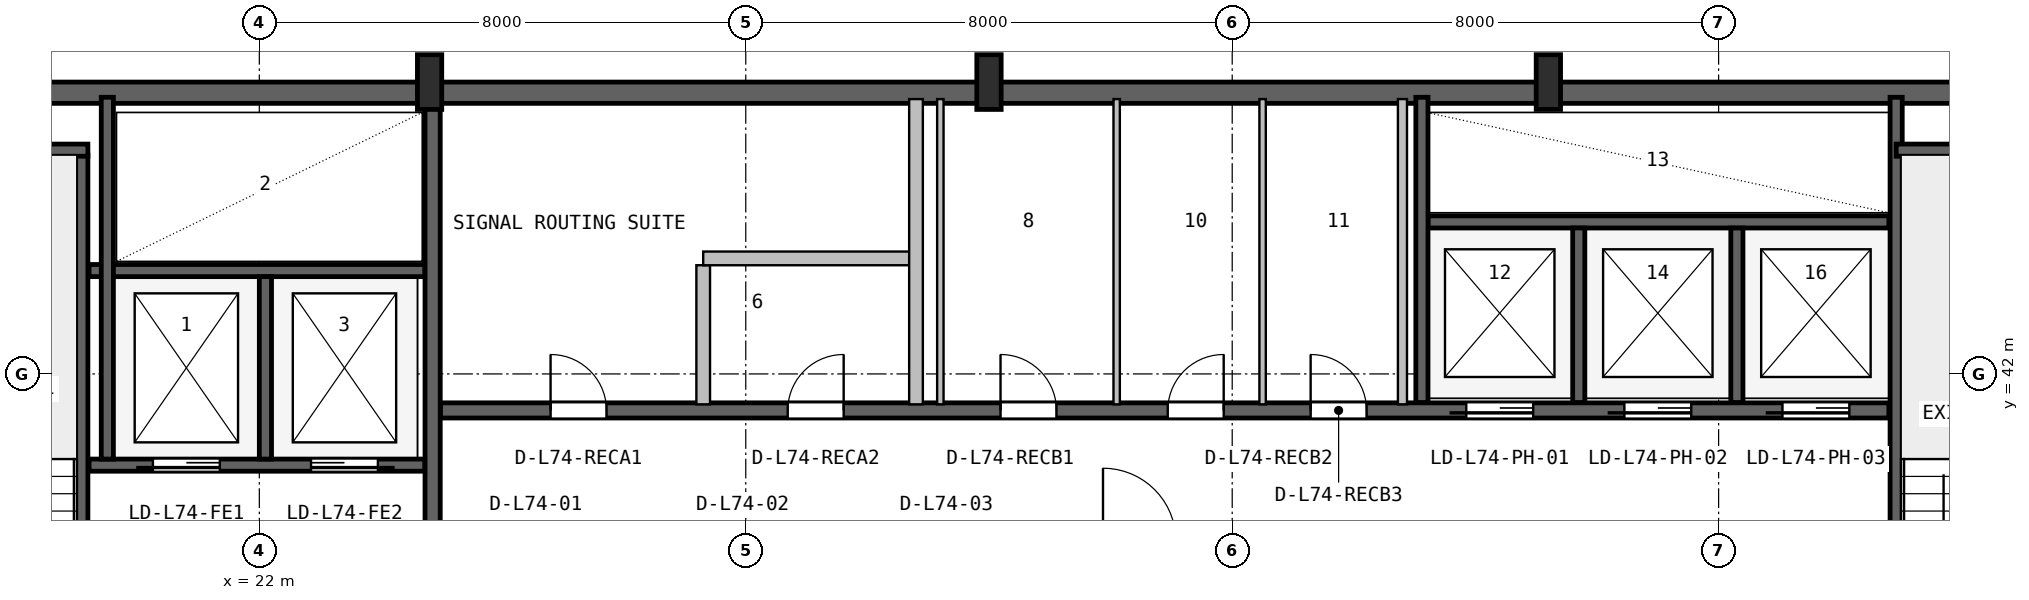
"""IFC4 building model, lengths in metres.
Left out: names, types, materials, properties, quantities, classifications, styles, units other than length and angle.
Written with IfcOpenShell. Run it as: python <this file> out.ifc"""

import sys

from ifc_helpers import new_model, si_unit, direction, frame, frame_2d, origin, origin_2d, place, context, subcontext, project, spatial, rectangle, i_section, extrude, source, transform, mapped, element, fill, save


model = new_model("IFC4")
c1 = context("Model", 3, precision=1e-05, world=origin(), true_north=direction((0.0, 1.0)))
c2 = subcontext(c1, "Body", "Model", "MODEL_VIEW")
j1 = project(units=[si_unit("LENGTHUNIT", "METRE"), si_unit("PLANEANGLEUNIT", "RADIAN")], contexts=[c1])
p1 = place(None, origin())
s1 = spatial("IfcSite", under=j1, at=p1, CompositionType="ELEMENT")
p2 = place(p1, origin())
s2 = spatial("IfcBuilding", under=s1, at=p2, CompositionType="ELEMENT")
p3 = place(p2, frame((0.0, 0.0, 296.4)))
s3 = spatial("IfcBuildingStorey", under=s2, at=p3, CompositionType="ELEMENT", Elevation=296.4)
p4 = place(p3, frame((15.325, 46.625, 0.0), z_axis=(0.0, 0.0, 1.0), x_axis=(1.0, 0.0, 0.0)))
e1 = element("IfcWall", 1, at=p4, inside=s3, PredefinedType="SHEAR", context=c2, shape_type="SweptSolid", body=[
    extrude(rectangle(XDim=37.35, YDim=0.35, at=frame_2d((18.675, 0.0))), origin(), (0.0, 0.0, 1.0), 3.52),
])
m1 = source(origin(), c2, "Body", "SweptSolid", [
    extrude(i_section(OverallWidth=0.4, OverallDepth=0.9, WebThickness=0.016, FlangeThickness=0.028, FilletRadius=0.016, at=origin_2d()), origin(), (0.0, 0.0, 1.0), 3.8),
])
for number, where, z_axis, x_axis in (
    (2, (24.8, 46.8, 0.0), (0.0, 0.0, 1.0), (1.0, 0.0, 0.0)),
    (3, (34.0, 46.8, 0.0), (0.0, 0.0, 1.0), (1.0, 0.0, 0.0)),
    (4, (43.2, 46.8, 0.0), (0.0, 0.0, 1.0), (1.0, 0.0, 0.0)),
):
    element("IfcColumn", number, at=place(p3, frame(where, z_axis=z_axis, x_axis=x_axis)), inside=s3, PredefinedType="COLUMN", context=c2, shape_type="MappedRepresentation", body=[
        mapped(m1, transform((0.0, 0.0, 0.0), x_axis=(1.0, 0.0, 0.0), y_axis=(0.0, 1.0, 0.0), z_axis=(0.0, 0.0, 1.0), scale=1.0)),
    ])
p5 = place(p3, frame((19.08, 35.95, 0.0), z_axis=(0.0, 0.0, 1.0), x_axis=(0.0, 1.0, 0.0)))
e5 = element("IfcWall", 5, at=p5, inside=s3, PredefinedType="SHEAR", context=c2, shape_type="SweptSolid", body=[
    extrude(rectangle(XDim=9.65, YDim=0.2, at=frame_2d((4.825, 0.0))), origin(), (0.0, 0.0, 1.0), 3.52),
])
p6 = place(p5, frame((0.25, 0.0, 0.0)))
e6 = element("IfcOpeningElement", 6, at=p6, cuts=e5, PredefinedType="OPENING", context=c2, shape_type="SweptSolid", body=[
    extrude(rectangle(XDim=0.95, YDim=2.1, at=frame_2d((0.475, 1.05))), frame((0.0, 0.11, 0.0), z_axis=(0.0, -1.0, 0.0), x_axis=(1.0, 0.0, 0.0)), (0.0, 0.0, 1.0), 0.22),
])
p7 = place(p3, frame((15.95, 45.68, 0.0), z_axis=(0.0, 0.0, 1.0), x_axis=(1.0, 0.0, 0.0)))
e7 = element("IfcWall", 7, at=p7, inside=s3, PredefinedType="SHEAR", context=c2, shape_type="SweptSolid", body=[
    extrude(rectangle(XDim=3.23, YDim=0.2, at=frame_2d((1.615, 0.0))), origin(), (0.0, 0.0, 1.0), 3.52),
])
p8 = place(p3, frame((24.85, 36.05, 0.0), z_axis=(0.0, 0.0, 1.0), x_axis=(0.0, 1.0, 0.0)))
e8 = element("IfcWall", 8, at=p8, inside=s3, PredefinedType="SHEAR", context=c2, shape_type="SweptSolid", body=[
    extrude(rectangle(XDim=10.45, YDim=0.25, at=frame_2d((5.225, 0.0))), origin(), (0.0, 0.0, 1.0), 3.52),
])
p9 = place(p3, frame((19.2, 40.5, 0.0), z_axis=(0.0, 0.0, 1.0), x_axis=(1.0, 0.0, 0.0)))
e9 = element("IfcWall", 9, at=p9, inside=s3, PredefinedType="SHEAR", context=c2, shape_type="SweptSolid", body=[
    extrude(rectangle(XDim=5.52, YDim=0.2, at=frame_2d((2.76, 0.0))), origin(), (0.0, 0.0, 1.0), 3.52),
])
p10 = place(p9, frame((1.05, 0.0, 0.0)))
e10 = element("IfcOpeningElement", 10, at=p10, cuts=e9, PredefinedType="OPENING", context=c2, shape_type="SweptSolid", body=[
    extrude(rectangle(XDim=1.1, YDim=2.18, at=frame_2d((0.55, 1.09))), frame((0.0, 0.11, 0.0), z_axis=(0.0, -1.0, 0.0), x_axis=(1.0, 0.0, 0.0)), (0.0, 0.0, 1.0), 0.22),
])
p11 = place(p9, frame((3.65, 0.0, 0.0)))
e11 = element("IfcOpeningElement", 11, at=p11, cuts=e9, PredefinedType="OPENING", context=c2, shape_type="SweptSolid", body=[
    extrude(rectangle(XDim=1.1, YDim=2.18, at=frame_2d((0.55, 1.09))), frame((0.0, 0.11, 0.0), z_axis=(0.0, -1.0, 0.0), x_axis=(1.0, 0.0, 0.0)), (0.0, 0.0, 1.0), 0.22),
])
p12 = place(p3, frame((19.2, 43.7, 0.0), z_axis=(0.0, 0.0, 1.0), x_axis=(1.0, 0.0, 0.0)))
e12 = element("IfcWall", 12, at=p12, inside=s3, PredefinedType="SHEAR", context=c2, shape_type="SweptSolid", body=[
    extrude(rectangle(XDim=5.52, YDim=0.2, at=frame_2d((2.76, 0.0))), origin(), (0.0, 0.0, 1.0), 3.52),
])
p13 = place(p3, frame((22.1, 40.6, 0.0), z_axis=(0.0, 0.0, 1.0), x_axis=(0.0, 1.0, 0.0)))
e13 = element("IfcWall", 13, at=p13, inside=s3, PredefinedType="SHEAR", context=c2, shape_type="SweptSolid", body=[
    extrude(rectangle(XDim=3.0, YDim=0.2, at=frame_2d((1.5, 0.0))), origin(), (0.0, 0.0, 1.0), 3.52),
])
p14 = place(p3, frame((19.5, 40.6, 0.0), z_axis=(0.0, 0.0, 1.0), x_axis=(0.0, 1.0, 0.0)))
e14 = element("IfcWall", 14, at=p14, inside=s3, PredefinedType="SHEAR", context=c2, shape_type="SweptSolid", body=[
    extrude(rectangle(XDim=5.95, YDim=0.2, at=frame_2d((2.975, 0.0))), origin(), (0.0, 0.0, 1.0), 3.52),
])
p15 = place(p3, frame((48.92, 36.05, 0.0), z_axis=(0.0, 0.0, 1.0), x_axis=(0.0, 1.0, 0.0)))
e15 = element("IfcWall", 15, at=p15, inside=s3, PredefinedType="SHEAR", context=c2, shape_type="SweptSolid", body=[
    extrude(rectangle(XDim=10.5, YDim=0.2, at=frame_2d((5.25, 0.0))), origin(), (0.0, 0.0, 1.0), 3.52),
])
p16 = place(p3, frame((48.92, 45.68, 0.0), z_axis=(0.0, 0.0, 1.0), x_axis=(1.0, 0.0, 0.0)))
e16 = element("IfcWall", 16, at=p16, inside=s3, PredefinedType="SHEAR", context=c2, shape_type="SweptSolid", body=[
    extrude(rectangle(XDim=3.18, YDim=0.2, at=frame_2d((1.59, 0.0))), origin(), (0.0, 0.0, 1.0), 3.52),
])
p17 = place(p3, frame((24.98, 41.4, 0.0), z_axis=(0.0, 0.0, 1.0), x_axis=(1.0, 0.0, 0.0)))
e17 = element("IfcWall", 17, at=p17, inside=s3, PredefinedType="SHEAR", context=c2, shape_type="SweptSolid", body=[
    extrude(rectangle(XDim=23.82, YDim=0.25, at=frame_2d((11.91, 0.0))), origin(), (0.0, 0.0, 1.0), 3.52),
])
p18 = place(p17, frame((16.87, 0.0, 0.0)))
e18 = element("IfcOpeningElement", 18, at=p18, cuts=e17, PredefinedType="OPENING", context=c2, shape_type="SweptSolid", body=[
    extrude(rectangle(XDim=1.1, YDim=2.18, at=frame_2d((0.55, 1.09))), frame((0.0, 0.135, 0.0), z_axis=(0.0, -1.0, 0.0), x_axis=(1.0, 0.0, 0.0)), (0.0, 0.0, 1.0), 0.27),
])
p19 = place(p17, frame((19.47, 0.0, 0.0)))
e19 = element("IfcOpeningElement", 19, at=p19, cuts=e17, PredefinedType="OPENING", context=c2, shape_type="SweptSolid", body=[
    extrude(rectangle(XDim=1.1, YDim=2.18, at=frame_2d((0.55, 1.09))), frame((0.0, 0.135, 0.0), z_axis=(0.0, -1.0, 0.0), x_axis=(1.0, 0.0, 0.0)), (0.0, 0.0, 1.0), 0.27),
])
p20 = place(p17, frame((22.07, 0.0, 0.0)))
e20 = element("IfcOpeningElement", 20, at=p20, cuts=e17, PredefinedType="OPENING", context=c2, shape_type="SweptSolid", body=[
    extrude(rectangle(XDim=1.1, YDim=2.18, at=frame_2d((0.55, 1.09))), frame((0.0, 0.135, 0.0), z_axis=(0.0, -1.0, 0.0), x_axis=(1.0, 0.0, 0.0)), (0.0, 0.0, 1.0), 0.27),
])
p21 = place(p17, frame((1.81, 0.0, 0.0)))
e21 = element("IfcOpeningElement", 21, at=p21, cuts=e17, PredefinedType="OPENING", context=c2, shape_type="SweptSolid", body=[
    extrude(rectangle(XDim=0.92, YDim=2.08, at=frame_2d((0.46, 1.04))), frame((0.0, 0.135, 0.0), z_axis=(0.0, -1.0, 0.0), x_axis=(1.0, 0.0, 0.0)), (0.0, 0.0, 1.0), 0.27),
])
p22 = place(p17, frame((5.71, 0.0, 0.0)))
e22 = element("IfcOpeningElement", 22, at=p22, cuts=e17, PredefinedType="OPENING", context=c2, shape_type="SweptSolid", body=[
    extrude(rectangle(XDim=0.92, YDim=2.08, at=frame_2d((0.46, 1.04))), frame((0.0, 0.135, 0.0), z_axis=(0.0, -1.0, 0.0), x_axis=(1.0, 0.0, 0.0)), (0.0, 0.0, 1.0), 0.27),
])
p23 = place(p17, frame((9.21, 0.0, 0.0)))
e23 = element("IfcOpeningElement", 23, at=p23, cuts=e17, PredefinedType="OPENING", context=c2, shape_type="SweptSolid", body=[
    extrude(rectangle(XDim=0.92, YDim=2.08, at=frame_2d((0.46, 1.04))), frame((0.0, 0.135, 0.0), z_axis=(0.0, -1.0, 0.0), x_axis=(1.0, 0.0, 0.0)), (0.0, 0.0, 1.0), 0.27),
])
p24 = place(p17, frame((11.96, 0.0, 0.0)))
e24 = element("IfcOpeningElement", 24, at=p24, cuts=e17, PredefinedType="OPENING", context=c2, shape_type="SweptSolid", body=[
    extrude(rectangle(XDim=0.92, YDim=2.08, at=frame_2d((0.46, 1.04))), frame((0.0, 0.135, 0.0), z_axis=(0.0, -1.0, 0.0), x_axis=(1.0, 0.0, 0.0)), (0.0, 0.0, 1.0), 0.27),
])
p25 = place(p17, frame((14.31, 0.0, 0.0)))
e25 = element("IfcOpeningElement", 25, at=p25, cuts=e17, PredefinedType="OPENING", context=c2, shape_type="SweptSolid", body=[
    extrude(rectangle(XDim=0.92, YDim=2.08, at=frame_2d((0.46, 1.04))), frame((0.0, 0.135, 0.0), z_axis=(0.0, -1.0, 0.0), x_axis=(1.0, 0.0, 0.0)), (0.0, 0.0, 1.0), 0.27),
])
p26 = place(p3, frame((41.22, 44.5, 0.0), z_axis=(0.0, 0.0, 1.0), x_axis=(1.0, 0.0, 0.0)))
e26 = element("IfcWall", 26, at=p26, inside=s3, PredefinedType="SHEAR", context=c2, shape_type="SweptSolid", body=[
    extrude(rectangle(XDim=7.58, YDim=0.2, at=frame_2d((3.79, 0.0))), origin(), (0.0, 0.0, 1.0), 3.52),
])
p27 = place(p3, frame((41.12, 41.53, 0.0), z_axis=(0.0, 0.0, 1.0), x_axis=(0.0, 1.0, 0.0)))
e27 = element("IfcWall", 27, at=p27, inside=s3, PredefinedType="SHEAR", context=c2, shape_type="SweptSolid", body=[
    extrude(rectangle(XDim=5.02, YDim=0.2, at=frame_2d((2.51, 0.0))), origin(), (0.0, 0.0, 1.0), 3.52),
])
for number, where, z_axis, x_axis in (
    (28, (43.7, 41.53, 0.0), (0.0, 0.0, 1.0), (0.0, 1.0, 0.0)),
    (29, (46.3, 41.53, 0.0), (0.0, 0.0, 1.0), (0.0, 1.0, 0.0)),
):
    element("IfcWall", number, at=place(p3, frame(where, z_axis=z_axis, x_axis=x_axis)), inside=s3, PredefinedType="SHEAR", context=c2, shape_type="SweptSolid", body=[
        extrude(rectangle(XDim=2.87, YDim=0.2, at=frame_2d((1.435, 0.0))), origin(), (0.0, 0.0, 1.0), 3.52),
    ])
p28 = place(p3, frame((29.3, 41.5, 0.0), z_axis=(0.0, 0.0, 1.0), x_axis=(0.0, 1.0, 0.0)))
e30 = element("IfcWall", 30, at=p28, inside=s3, PredefinedType="PARTITIONING", context=c2, shape_type="SweptSolid", body=[
    extrude(rectangle(XDim=2.288, YDim=0.225, at=frame_2d((1.144, 0.0))), origin(), (0.0, 0.0, 1.0), 3.5),
])
p29 = place(p3, frame((29.3, 43.9, 0.0), z_axis=(0.0, 0.0, 1.0), x_axis=(1.0, 0.0, 0.0)))
e31 = element("IfcWall", 31, at=p29, inside=s3, PredefinedType="PARTITIONING", context=c2, shape_type="SweptSolid", body=[
    extrude(rectangle(XDim=3.5, YDim=0.225, at=frame_2d((1.75, 0.0))), origin(), (0.0, 0.0, 1.0), 3.5),
])
p30 = place(p3, frame((32.8, 41.5, 0.0), z_axis=(0.0, 0.0, 1.0), x_axis=(0.0, 1.0, 0.0)))
e32 = element("IfcWall", 32, at=p30, inside=s3, PredefinedType="PARTITIONING", context=c2, shape_type="SweptSolid", body=[
    extrude(rectangle(XDim=5.02, YDim=0.225, at=frame_2d((2.51, 0.0))), origin(), (0.0, 0.0, 1.0), 3.5),
])
for number, where, z_axis, x_axis in (
    (33, (36.1, 41.5, 0.0), (0.0, 0.0, 1.0), (0.0, 1.0, 0.0)),
    (34, (33.2, 41.5, 0.0), (0.0, 0.0, 1.0), (0.0, 1.0, 0.0)),
    (35, (38.5, 41.5, 0.0), (0.0, 0.0, 1.0), (0.0, 1.0, 0.0)),
):
    element("IfcWall", number, at=place(p3, frame(where, z_axis=z_axis, x_axis=x_axis)), inside=s3, PredefinedType="PARTITIONING", context=c2, shape_type="SweptSolid", body=[
        extrude(rectangle(XDim=5.02, YDim=0.105, at=frame_2d((2.51, 0.0))), origin(), (0.0, 0.0, 1.0), 3.5),
    ])
p31 = place(p3, frame((40.8, 41.5, 0.0), z_axis=(0.0, 0.0, 1.0), x_axis=(0.0, 1.0, 0.0)))
e36 = element("IfcWall", 36, at=p31, inside=s3, PredefinedType="PARTITIONING", context=c2, shape_type="SweptSolid", body=[
    extrude(rectangle(XDim=5.02, YDim=0.15, at=frame_2d((2.51, 0.0))), origin(), (0.0, 0.0, 1.0), 3.5),
])
m2 = source(origin(), c2, "Body", "SweptSolid", [
    extrude(rectangle(XDim=1.1, YDim=2.18, at=frame_2d((0.55, 1.09))), frame((0.0, 0.025, 0.0), z_axis=(0.0, -1.0, 0.0), x_axis=(1.0, 0.0, 0.0)), (0.0, 0.0, 1.0), 0.05),
])
p32 = place(p10, frame((1.1, 0.0, 0.0), z_axis=(0.0, 0.0, 1.0), x_axis=(-1.0, 0.0, 0.0)))
e37 = element("IfcDoor", 37, at=p32, inside=s3, OperationType="SLIDING_TO_LEFT", PredefinedType="DOOR", context=c2, shape_type="MappedRepresentation", body=[
    mapped(m2, transform((0.0, 0.0, 0.0), x_axis=(1.0, 0.0, 0.0), y_axis=(0.0, 1.0, 0.0), z_axis=(0.0, 0.0, 1.0), scale=1.0)),
])
fill(e10, e37)
p33 = place(p11, frame((1.1, 0.0, 0.0), z_axis=(0.0, 0.0, 1.0), x_axis=(-1.0, 0.0, 0.0)))
e38 = element("IfcDoor", 38, at=p33, inside=s3, OperationType="SLIDING_TO_RIGHT", PredefinedType="DOOR", context=c2, shape_type="MappedRepresentation", body=[
    mapped(m2, transform((0.0, 0.0, 0.0), x_axis=(1.0, 0.0, 0.0), y_axis=(0.0, 1.0, 0.0), z_axis=(0.0, 0.0, 1.0), scale=1.0)),
])
fill(e11, e38)
p34 = place(p18, frame((1.1, 0.0, 0.0), z_axis=(0.0, 0.0, 1.0), x_axis=(-1.0, 0.0, 0.0)))
e39 = element("IfcDoor", 39, at=p34, inside=s3, OperationType="SLIDING_TO_LEFT", PredefinedType="DOOR", context=c2, shape_type="MappedRepresentation", body=[
    mapped(m2, transform((0.0, 0.0, 0.0), x_axis=(1.0, 0.0, 0.0), y_axis=(0.0, 1.0, 0.0), z_axis=(0.0, 0.0, 1.0), scale=1.0)),
])
fill(e18, e39)
p35 = place(p19, frame((1.1, 0.0, 0.0), z_axis=(0.0, 0.0, 1.0), x_axis=(-1.0, 0.0, 0.0)))
e40 = element("IfcDoor", 40, at=p35, inside=s3, OperationType="SLIDING_TO_LEFT", PredefinedType="DOOR", context=c2, shape_type="MappedRepresentation", body=[
    mapped(m2, transform((0.0, 0.0, 0.0), x_axis=(1.0, 0.0, 0.0), y_axis=(0.0, 1.0, 0.0), z_axis=(0.0, 0.0, 1.0), scale=1.0)),
])
fill(e19, e40)
p36 = place(p20, frame((1.1, 0.0, 0.0), z_axis=(0.0, 0.0, 1.0), x_axis=(-1.0, 0.0, 0.0)))
e41 = element("IfcDoor", 41, at=p36, inside=s3, OperationType="SLIDING_TO_LEFT", PredefinedType="DOOR", context=c2, shape_type="MappedRepresentation", body=[
    mapped(m2, transform((0.0, 0.0, 0.0), x_axis=(1.0, 0.0, 0.0), y_axis=(0.0, 1.0, 0.0), z_axis=(0.0, 0.0, 1.0), scale=1.0)),
])
fill(e20, e41)
m3 = source(origin(), c2, "Body", "SweptSolid", [
    extrude(rectangle(XDim=0.92, YDim=2.08, at=frame_2d((0.46, 1.04))), frame((0.0, 0.025, 0.0), z_axis=(0.0, -1.0, 0.0), x_axis=(1.0, 0.0, 0.0)), (0.0, 0.0, 1.0), 0.05),
])
p37 = place(p21, origin())
e42 = element("IfcDoor", 42, at=p37, inside=s3, OperationType="SINGLE_SWING_LEFT", PredefinedType="DOOR", context=c2, shape_type="MappedRepresentation", body=[
    mapped(m3, transform((0.0, 0.0, 0.0), x_axis=(1.0, 0.0, 0.0), y_axis=(0.0, 1.0, 0.0), z_axis=(0.0, 0.0, 1.0), scale=1.0)),
])
fill(e21, e42)
p38 = place(p22, origin())
e43 = element("IfcDoor", 43, at=p38, inside=s3, OperationType="SINGLE_SWING_RIGHT", PredefinedType="DOOR", context=c2, shape_type="MappedRepresentation", body=[
    mapped(m3, transform((0.0, 0.0, 0.0), x_axis=(1.0, 0.0, 0.0), y_axis=(0.0, 1.0, 0.0), z_axis=(0.0, 0.0, 1.0), scale=1.0)),
])
fill(e22, e43)
p39 = place(p23, origin())
e44 = element("IfcDoor", 44, at=p39, inside=s3, OperationType="SINGLE_SWING_LEFT", PredefinedType="DOOR", context=c2, shape_type="MappedRepresentation", body=[
    mapped(m3, transform((0.0, 0.0, 0.0), x_axis=(1.0, 0.0, 0.0), y_axis=(0.0, 1.0, 0.0), z_axis=(0.0, 0.0, 1.0), scale=1.0)),
])
fill(e23, e44)
p40 = place(p24, origin())
e45 = element("IfcDoor", 45, at=p40, inside=s3, OperationType="SINGLE_SWING_RIGHT", PredefinedType="DOOR", context=c2, shape_type="MappedRepresentation", body=[
    mapped(m3, transform((0.0, 0.0, 0.0), x_axis=(1.0, 0.0, 0.0), y_axis=(0.0, 1.0, 0.0), z_axis=(0.0, 0.0, 1.0), scale=1.0)),
])
fill(e24, e45)
p41 = place(p25, origin())
e46 = element("IfcDoor", 46, at=p41, inside=s3, OperationType="SINGLE_SWING_LEFT", PredefinedType="DOOR", context=c2, shape_type="MappedRepresentation", body=[
    mapped(m3, transform((0.0, 0.0, 0.0), x_axis=(1.0, 0.0, 0.0), y_axis=(0.0, 1.0, 0.0), z_axis=(0.0, 0.0, 1.0), scale=1.0)),
])
fill(e25, e46)
save(model, sys.argv[1])
